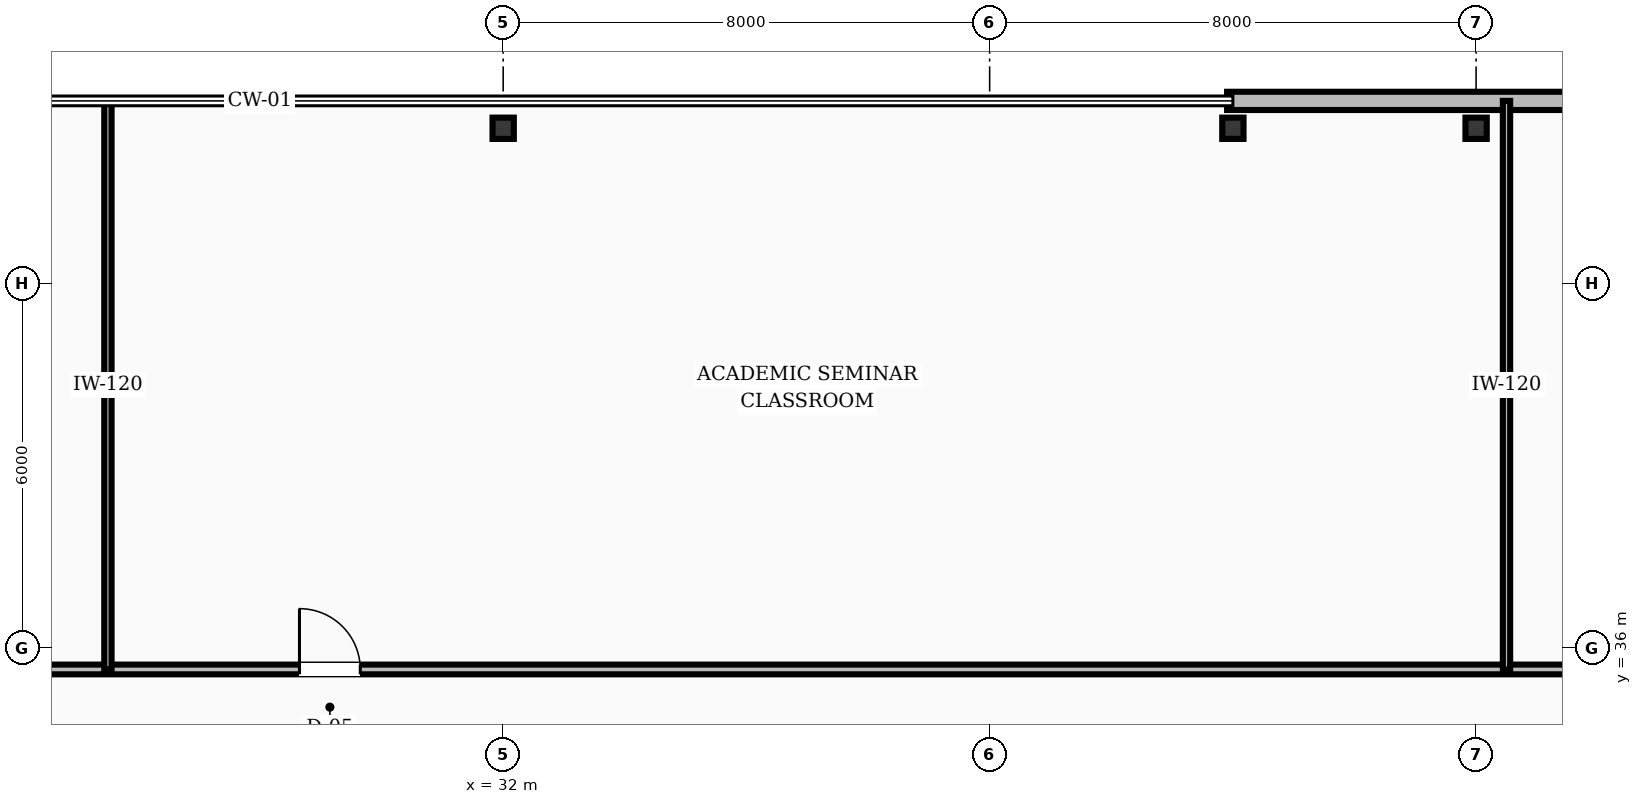
"""IFC4 building model, lengths in metres.
Left out: names, types, materials, properties, quantities, classifications, styles, units other than length and angle.
Written with IfcOpenShell. Run it as: python <this file> out.ifc"""

import sys

from ifc_helpers import new_model, si_unit, direction, frame, frame_2d, origin, origin_2d, place, context, subcontext, project, spatial, rectangle, hollow_rectangle, i_section, extrude, element, fill, save


model = new_model("IFC4")
c1 = context("Model", 3, precision=1e-05, world=origin(), true_north=direction((0.0, 1.0)))
c2 = subcontext(c1, "Body", "Model", "MODEL_VIEW")
j1 = project(units=[si_unit("LENGTHUNIT", "METRE"), si_unit("PLANEANGLEUNIT", "RADIAN")], contexts=[c1])
p1 = place(None, origin())
s1 = spatial("IfcSite", under=j1, at=p1, CompositionType="ELEMENT")
p2 = place(p1, origin())
s2 = spatial("IfcBuilding", under=s1, at=p2, CompositionType="ELEMENT")
p3 = place(p2, frame((0.0, 0.0, 14.8)))
s3 = spatial("IfcBuildingStorey", under=s2, at=p3, CompositionType="ELEMENT", Elevation=14.8)
for number, where, z_axis, x_axis in (
    (1, (32.0, 44.55, 0.0), (0.0, 0.0, 1.0), (1.0, 0.0, 0.0)),
    (2, (44.0, 44.55, 0.0), (0.0, 0.0, 1.0), (1.0, 0.0, 0.0)),
):
    element("IfcColumn", number, at=place(p3, frame(where, z_axis=z_axis, x_axis=x_axis)), inside=s3, PredefinedType="COLUMN", context=c2, shape_type="SweptSolid", body=[
        extrude(i_section(OverallWidth=0.35, OverallDepth=0.35, WebThickness=0.012, FlangeThickness=0.019, FilletRadius=0.016, at=origin_2d()), origin(), (0.0, 0.0, 1.0), 4.8),
    ])
p4 = place(p3, frame((48.0, 44.55, 0.0), z_axis=(0.0, 0.0, 1.0), x_axis=(1.0, 0.0, 0.0)))
e3 = element("IfcColumn", 3, at=p4, inside=s3, PredefinedType="PILASTER", context=c2, shape_type="SweptSolid", body=[
    extrude(hollow_rectangle(XDim=0.35, YDim=0.35, WallThickness=0.016, at=origin_2d()), origin(), (0.0, 0.0, 1.0), 4.8),
])
p5 = place(p3, frame((52.0, 45.0, 0.0), z_axis=(0.0, 0.0, 1.0), x_axis=(-1.0, 0.0, 0.0)))
e4 = element("IfcWall", 4, at=p5, inside=s3, PredefinedType="STANDARD", context=c2, shape_type="SweptSolid", body=[
    extrude(rectangle(XDim=8.095, YDim=0.3, at=frame_2d((4.047, 0.0))), origin(), (0.0, 0.0, 1.0), 3.57),
])
p6 = place(p3, frame((8.65, 35.65, 0.0), z_axis=(0.0, 0.0, 1.0), x_axis=(1.0, 0.0, 0.0)))
e5 = element("IfcWall", 5, at=p6, inside=s3, PredefinedType="SOLIDWALL", context=c2, shape_type="SweptSolid", body=[
    extrude(rectangle(XDim=46.7, YDim=0.16, at=frame_2d((23.35, 0.0))), origin(), (0.0, 0.0, 1.0), 3.52),
])
p7 = place(p6, frame((6.0, 0.0, 0.0)))
e6 = element("IfcOpeningElement", 6, at=p7, cuts=e5, PredefinedType="OPENING", context=c2, shape_type="SweptSolid", body=[
    extrude(rectangle(XDim=1.2, YDim=2.1, at=frame_2d((0.6, 1.05))), frame((0.0, 0.09, 0.0), z_axis=(0.0, -1.0, 0.0), x_axis=(1.0, 0.0, 0.0)), (0.0, 0.0, 1.0), 0.18),
])
p8 = place(p6, frame((20.0, 0.0, 0.0)))
e7 = element("IfcOpeningElement", 7, at=p8, cuts=e5, PredefinedType="OPENING", context=c2, shape_type="SweptSolid", body=[
    extrude(rectangle(XDim=1.0, YDim=2.1, at=frame_2d((0.5, 1.05))), frame((0.0, 0.09, 0.0), z_axis=(0.0, -1.0, 0.0), x_axis=(1.0, 0.0, 0.0)), (0.0, 0.0, 1.0), 0.18),
])
p9 = place(p6, frame((41.5, 0.0, 0.0)))
e8 = element("IfcOpeningElement", 8, at=p9, cuts=e5, PredefinedType="OPENING", context=c2, shape_type="SweptSolid", body=[
    extrude(rectangle(XDim=0.95, YDim=2.1, at=frame_2d((0.475, 1.05))), frame((0.0, 0.09, 0.0), z_axis=(0.0, -1.0, 0.0), x_axis=(1.0, 0.0, 0.0)), (0.0, 0.0, 1.0), 0.18),
])
for number, where, z_axis, x_axis in (
    (9, (25.5, 35.65, 0.0), (0.0, 0.0, 1.0), (0.0, 1.0, 0.0)),
    (10, (48.5, 35.65, 0.0), (0.0, 0.0, 1.0), (0.0, 1.0, 0.0)),
):
    element("IfcWall", number, at=place(p3, frame(where, z_axis=z_axis, x_axis=x_axis)), inside=s3, PredefinedType="PARTITIONING", context=c2, shape_type="SweptSolid", body=[
        extrude(rectangle(XDim=9.35, YDim=0.12, at=frame_2d((4.675, 0.0))), origin(), (0.0, 0.0, 1.0), 3.52),
    ])
p10 = place(p8, origin())
e11 = element("IfcDoor", 11, at=p10, inside=s3, OperationType="SINGLE_SWING_LEFT", PredefinedType="DOOR", context=c2, shape_type="SweptSolid", body=[
    extrude(rectangle(XDim=1.0, YDim=2.1, at=frame_2d((0.5, 1.05))), frame((0.0, 0.025, 0.0), z_axis=(0.0, -1.0, 0.0), x_axis=(1.0, 0.0, 0.0)), (0.0, 0.0, 1.0), 0.05),
])
fill(e7, e11)
save(model, sys.argv[1])
